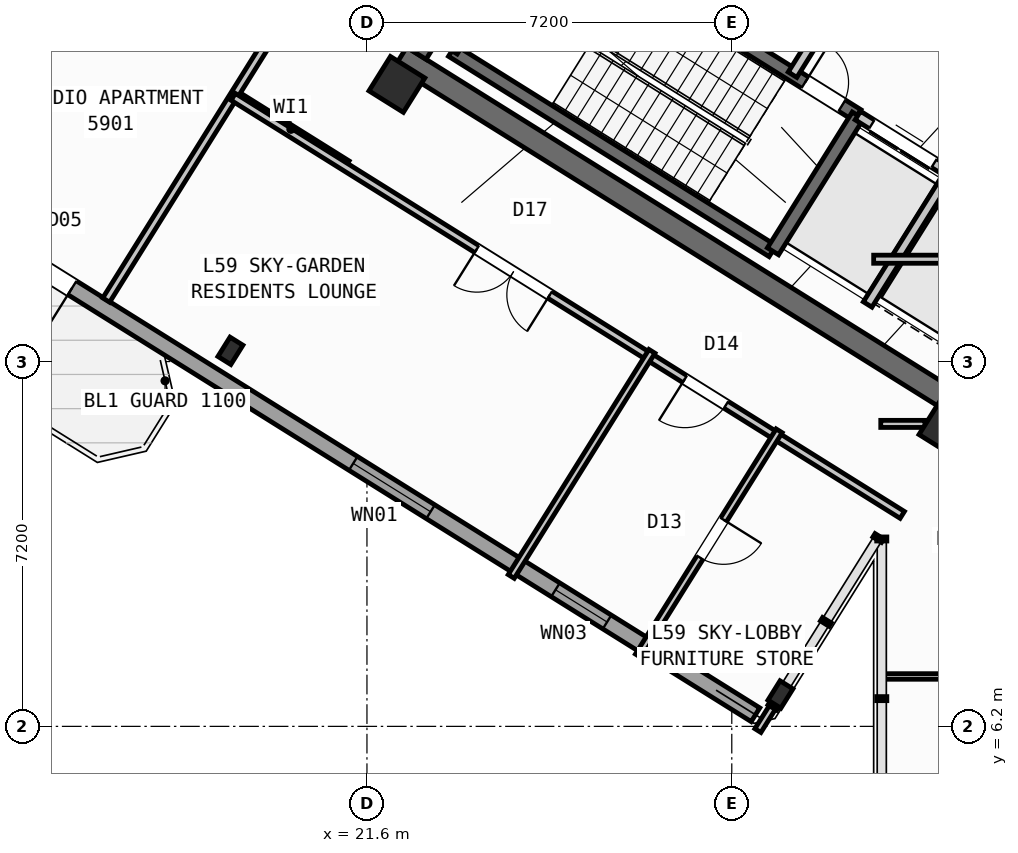
"""IFC4 building model, lengths in metres.
Left out: names, types, materials, properties, quantities, classifications, styles, units other than length and angle.
Written with IfcOpenShell. Run it as: python <this file> out.ifc"""

import sys

from ifc_helpers import new_model, si_unit, direction, frame, frame_2d, origin, origin_2d, place, context, subcontext, project, spatial, rectangle, hollow_rectangle, i_section, extrude, source, transform, mapped, element, fill, save


model = new_model("IFC4")
c1 = context("Model", 3, precision=1e-05, world=origin(), true_north=direction((0.0, 1.0)))
c2 = subcontext(c1, "Body", "Model", "MODEL_VIEW")
j1 = project(units=[si_unit("LENGTHUNIT", "METRE"), si_unit("PLANEANGLEUNIT", "RADIAN")], contexts=[c1])
p1 = place(None, origin())
s1 = spatial("IfcSite", under=j1, at=p1, CompositionType="ELEMENT")
p2 = place(p1, origin())
s2 = spatial("IfcBuilding", under=s1, at=p2, CompositionType="ELEMENT")
p3 = place(p2, frame((0.0, 0.0, 233.7)))
s3 = spatial("IfcBuildingStorey", under=s2, at=p3, CompositionType="ELEMENT", Elevation=233.7)
p4 = place(p3, frame((33.324, 12.503, 0.0), z_axis=(0.0, 0.0, 1.0), x_axis=(-0.848043529849, 0.529926571782, 0.0)))
e1 = element("IfcWall", 1, at=p4, inside=s3, PredefinedType="SHEAR", context=c2, shape_type="SweptSolid", body=[
    extrude(rectangle(XDim=13.04, YDim=0.45, at=frame_2d((6.52, 0.0))), origin(), (0.0, 0.0, 1.0), 4.55),
])
p5 = place(p3, frame((26.007, 24.976, 0.0), z_axis=(0.0, 0.0, 1.0), x_axis=(-0.529931155655, -0.848040665456, 0.0)))
e2 = element("IfcWall", 2, at=p5, inside=s3, PredefinedType="SHEAR", context=c2, shape_type="SweptSolid", body=[
    extrude(rectangle(XDim=6.475, YDim=0.45, at=frame_2d((3.238, 0.0))), origin(), (0.0, 0.0, 1.0), 4.55),
])
m1 = source(origin(), c2, "Body", "SweptSolid", [
    extrude(hollow_rectangle(XDim=0.8, YDim=0.8, WallThickness=0.032, at=origin_2d()), origin(), (0.0, 0.0, 1.0), 4.8),
])
p6 = place(p3, frame((33.046, 12.087, 0.0), z_axis=(0.0, 0.0, 1.0), x_axis=(-0.848048096156, 0.529919264233, 0.0)))
e3 = element("IfcColumn", 3, at=p6, inside=s3, PredefinedType="COLUMN", context=c2, shape_type="MappedRepresentation", body=[
    mapped(m1, transform((0.0, 0.0, 0.0), scale=1.0)),
])
m2 = source(origin(), c2, "Body", "SweptSolid", [
    extrude(i_section(OverallWidth=0.3, OverallDepth=0.45, WebThickness=0.014, FlangeThickness=0.026, at=origin_2d()), origin(), (0.0, 0.0, 1.0), 4.8),
])
p7 = place(p3, frame((29.761, 6.829, 0.0), z_axis=(0.0, 0.0, 1.0), x_axis=(-0.848048096156, 0.529919264233, 0.0)))
e4 = element("IfcColumn", 4, at=p7, inside=s3, PredefinedType="COLUMN", context=c2, shape_type="MappedRepresentation", body=[
    mapped(m2, transform((0.0, 0.0, 0.0), scale=1.0)),
])
p8 = place(p3, frame((22.191, 18.87, 0.0), z_axis=(0.0, 0.0, 1.0), x_axis=(-0.848048096156, 0.529919264233, 0.0)))
e5 = element("IfcColumn", 5, at=p8, inside=s3, PredefinedType="COLUMN", context=c2, shape_type="MappedRepresentation", body=[
    mapped(m1, transform((0.0, 0.0, 0.0), scale=1.0)),
])
p9 = place(p3, frame((18.906, 13.612, 0.0), z_axis=(0.0, 0.0, 1.0), x_axis=(-0.848048096156, 0.529919264233, 0.0)))
e6 = element("IfcColumn", 6, at=p9, inside=s3, PredefinedType="COLUMN", context=c2, shape_type="MappedRepresentation", body=[
    mapped(m2, transform((0.0, 0.0, 0.0), scale=1.0)),
])
p10 = place(p3, frame((29.268, 6.429, 0.0), z_axis=(0.0, 0.0, 1.0), x_axis=(-0.848049971435, 0.529916263149, 0.0)))
e7 = element("IfcWall", 7, at=p10, inside=s3, PredefinedType="STANDARD", context=c2, shape_type="SweptSolid", body=[
    extrude(rectangle(XDim=31.588, YDim=0.32, at=frame_2d((15.794, 0.0))), origin(), (0.0, 0.0, 1.0), 4.55),
])
p11 = place(p10, frame((15.901, 0.0, 0.0)))
e8 = element("IfcOpeningElement", 8, at=p11, cuts=e7, PredefinedType="OPENING", context=c2, shape_type="SweptSolid", body=[
    extrude(rectangle(XDim=1.2, YDim=2.15, at=frame_2d((0.6, 1.075))), frame((0.0, 0.17, 0.0), z_axis=(0.0, -1.0, 0.0), x_axis=(1.0, 0.0, 0.0)), (0.0, 0.0, 1.0), 0.34),
])
p12 = place(p10, frame((3.454, 0.0, 0.95)))
e9 = element("IfcOpeningElement", 9, at=p12, cuts=e7, PredefinedType="OPENING", context=c2, shape_type="SweptSolid", body=[
    extrude(rectangle(XDim=1.2, YDim=1.4, at=frame_2d((0.6, 0.7))), frame((0.0, 0.17, 0.0), z_axis=(0.0, -1.0, 0.0), x_axis=(1.0, 0.0, 0.0)), (0.0, 0.0, 1.0), 0.34),
])
p13 = place(p10, frame((7.561, 0.0, 0.85)))
e10 = element("IfcOpeningElement", 10, at=p13, cuts=e7, PredefinedType="OPENING", context=c2, shape_type="SweptSolid", body=[
    extrude(rectangle(XDim=1.8, YDim=1.5, at=frame_2d((0.9, 0.75))), frame((0.0, 0.17, 0.0), z_axis=(0.0, -1.0, 0.0), x_axis=(1.0, 0.0, 0.0)), (0.0, 0.0, 1.0), 0.34),
])
p14 = place(p10, frame((28.254, 0.0, 0.95)))
e11 = element("IfcOpeningElement", 11, at=p14, cuts=e7, PredefinedType="OPENING", context=c2, shape_type="SweptSolid", body=[
    extrude(rectangle(XDim=1.2, YDim=1.4, at=frame_2d((0.6, 0.7))), frame((0.0, 0.17, 0.0), z_axis=(0.0, -1.0, 0.0), x_axis=(1.0, 0.0, 0.0)), (0.0, 0.0, 1.0), 0.34),
])
p15 = place(p10, frame((19.234, 0.0, 1.0)))
e12 = element("IfcOpeningElement", 12, at=p15, cuts=e7, PredefinedType="OPENING", context=c2, shape_type="SweptSolid", body=[
    extrude(rectangle(XDim=0.9, YDim=1.25, at=frame_2d((0.45, 0.625))), frame((0.0, 0.17, 0.0), z_axis=(0.0, -1.0, 0.0), x_axis=(1.0, 0.0, 0.0)), (0.0, 0.0, 1.0), 0.34),
])
p16 = place(p10, frame((21.721, 0.0, 1.0)))
e13 = element("IfcOpeningElement", 13, at=p16, cuts=e7, PredefinedType="OPENING", context=c2, shape_type="SweptSolid", body=[
    extrude(rectangle(XDim=0.65, YDim=1.15, at=frame_2d((0.325, 0.575))), frame((0.0, 0.17, 0.0), z_axis=(0.0, -1.0, 0.0), x_axis=(1.0, 0.0, 0.0)), (0.0, 0.0, 1.0), 0.34),
])
p17 = place(p10, frame((23.631, 0.0, 1.0)))
e14 = element("IfcOpeningElement", 14, at=p17, cuts=e7, PredefinedType="OPENING", context=c2, shape_type="SweptSolid", body=[
    extrude(rectangle(XDim=0.9, YDim=1.25, at=frame_2d((0.45, 0.625))), frame((0.0, 0.17, 0.0), z_axis=(0.0, -1.0, 0.0), x_axis=(1.0, 0.0, 0.0)), (0.0, 0.0, 1.0), 0.34),
])
p18 = place(p10, frame((25.666, 0.0, 1.0)))
e15 = element("IfcOpeningElement", 15, at=p18, cuts=e7, PredefinedType="OPENING", context=c2, shape_type="SweptSolid", body=[
    extrude(rectangle(XDim=0.9, YDim=1.25, at=frame_2d((0.45, 0.625))), frame((0.0, 0.17, 0.0), z_axis=(0.0, -1.0, 0.0), x_axis=(1.0, 0.0, 0.0)), (0.0, 0.0, 1.0), 0.34),
])
p19 = place(p3, frame((29.605, 15.581, 0.0), z_axis=(0.0, 0.0, 1.0), x_axis=(-0.848036911448, 0.529937163087, 0.0)))
e16 = element("IfcWall", 16, at=p19, inside=s3, PredefinedType="SHEAR", context=c2, shape_type="SweptSolid", body=[
    extrude(rectangle(XDim=7.46, YDim=0.26, at=frame_2d((3.73, 0.0))), origin(), (0.0, 0.0, 1.0), 4.55),
])
p20 = place(p3, frame((31.28, 18.261, 0.0), z_axis=(0.0, 0.0, 1.0), x_axis=(-0.848051618787, 0.529913626805, 0.0)))
e17 = element("IfcWall", 17, at=p20, inside=s3, PredefinedType="SHEAR", context=c2, shape_type="SweptSolid", body=[
    extrude(rectangle(XDim=7.46, YDim=0.26, at=frame_2d((3.73, 0.0))), origin(), (0.0, 0.0, 1.0), 4.55),
])
p21 = place(p20, frame((0.36, 0.0, 0.0)))
e18 = element("IfcOpeningElement", 18, at=p21, cuts=e17, PredefinedType="OPENING", context=c2, shape_type="SweptSolid", body=[
    extrude(rectangle(XDim=0.86, YDim=2.05, at=frame_2d((0.43, 1.025))), frame((0.0, 0.14, 0.0), z_axis=(0.0, -1.0, 0.0), x_axis=(1.0, 0.0, 0.0)), (0.0, 0.0, 1.0), 0.28),
])
p22 = place(p3, frame((31.288, 18.256, 0.0), z_axis=(0.0, 0.0, 1.0), x_axis=(-0.529943379326, -0.848033026897, 0.0)))
e19 = element("IfcWall", 19, at=p22, inside=s3, PredefinedType="SHEAR", context=c2, shape_type="SweptSolid", body=[
    extrude(rectangle(XDim=3.16, YDim=0.26, at=frame_2d((1.58, 0.0))), origin(), (0.0, 0.0, 1.0), 4.55),
])
p23 = place(p3, frame((24.945, 22.22, 0.0), z_axis=(0.0, 0.0, 1.0), x_axis=(-0.529908658664, -0.84805472316, 0.0)))
e20 = element("IfcWall", 20, at=p23, inside=s3, PredefinedType="SHEAR", context=c2, shape_type="SweptSolid", body=[
    extrude(rectangle(XDim=3.16, YDim=0.26, at=frame_2d((1.58, 0.0))), origin(), (0.0, 0.0, 1.0), 4.55),
])
p24 = place(p3, frame((34.933, 15.978, 0.0), z_axis=(0.0, 0.0, 1.0), x_axis=(-0.848055739377, 0.529907032327, 0.0)))
e21 = element("IfcWall", 21, at=p24, inside=s3, PredefinedType="STANDARD", context=c2, shape_type="SweptSolid", body=[
    extrude(rectangle(XDim=4.298, YDim=0.2, at=frame_2d((2.149, 0.0))), origin(), (0.0, 0.0, 1.0), 4.54),
])
p25 = place(p24, frame((0.448, 0.0, 0.0)))
e22 = element("IfcOpeningElement", 22, at=p25, cuts=e21, PredefinedType="OPENING", context=c2, shape_type="SweptSolid", body=[
    extrude(rectangle(XDim=1.3, YDim=2.2, at=frame_2d((0.65, 1.1))), frame((0.0, 0.11, 0.0), z_axis=(0.0, -1.0, 0.0), x_axis=(1.0, 0.0, 0.0)), (0.0, 0.0, 1.0), 0.22),
])
p26 = place(p24, frame((2.523, 0.0, 0.0)))
e23 = element("IfcOpeningElement", 23, at=p26, cuts=e21, PredefinedType="OPENING", context=c2, shape_type="SweptSolid", body=[
    extrude(rectangle(XDim=1.45, YDim=2.25, at=frame_2d((0.725, 1.125))), frame((0.0, 0.11, 0.0), z_axis=(0.0, -1.0, 0.0), x_axis=(1.0, 0.0, 0.0)), (0.0, 0.0, 1.0), 0.22),
])
p27 = place(p3, frame((36.459, 18.421, 0.0), z_axis=(0.0, 0.0, 1.0), x_axis=(-0.848059591691, 0.529900867089, 0.0)))
e24 = element("IfcWall", 24, at=p27, inside=s3, PredefinedType="STANDARD", context=c2, shape_type="SweptSolid", body=[
    extrude(rectangle(XDim=5.818, YDim=0.2, at=frame_2d((2.909, 0.0))), origin(), (0.0, 0.0, 1.0), 4.54),
])
p28 = place(p27, frame((2.598, 0.0, 0.0)))
e25 = element("IfcOpeningElement", 25, at=p28, cuts=e24, PredefinedType="OPENING", context=c2, shape_type="SweptSolid", body=[
    extrude(rectangle(XDim=1.15, YDim=2.1, at=frame_2d((0.575, 1.05))), frame((0.0, 0.11, 0.0), z_axis=(0.0, -1.0, 0.0), x_axis=(1.0, 0.0, 0.0)), (0.0, 0.0, 1.0), 0.22),
])
p29 = place(p3, frame((33.029, 17.003, 0.0), z_axis=(0.0, 0.0, 1.0), x_axis=(-0.529916267533, -0.848049968695, 0.0)))
e26 = element("IfcWall", 26, at=p29, inside=s3, PredefinedType="STANDARD", context=c2, shape_type="SweptSolid", body=[
    extrude(rectangle(XDim=2.92, YDim=0.2, at=frame_2d((1.46, 0.0))), origin(), (0.0, 0.0, 1.0), 4.54),
])
p30 = place(p3, frame((31.525, 21.504, 0.0), z_axis=(0.0, 0.0, 1.0), x_axis=(-0.529907497854, -0.848055448493, 0.0)))
e27 = element("IfcWall", 27, at=p30, inside=s3, PredefinedType="STANDARD", context=c2, shape_type="SweptSolid", body=[
    extrude(rectangle(XDim=2.88, YDim=0.2, at=frame_2d((1.44, 0.0))), origin(), (0.0, 0.0, 1.0), 4.54),
])
p31 = place(p3, frame((21.206, 17.292, 0.0), z_axis=(0.0, 0.0, 1.0), x_axis=(-0.848050851465, 0.529914854792, 0.0)))
e28 = element("IfcWall", 28, at=p31, inside=s3, PredefinedType="PARTITIONING", context=c2, shape_type="SweptSolid", body=[
    extrude(rectangle(XDim=2.61, YDim=0.16, at=frame_2d((1.305, 0.0))), origin(), (0.0, 0.0, 1.0), 4.54),
])
p32 = place(p3, frame((23.899, 26.529, 0.0), z_axis=(0.0, 0.0, 1.0), x_axis=(-0.529917716469, -0.848049063305, 0.0)))
e29 = element("IfcWall", 29, at=p32, inside=s3, PredefinedType="PARTITIONING", context=c2, shape_type="SweptSolid", body=[
    extrude(rectangle(XDim=14.05, YDim=0.16, at=frame_2d((7.025, 0.0))), origin(), (0.0, 0.0, 1.0), 4.54),
])
p33 = place(p3, frame((16.545, 21.912, 0.0), z_axis=(0.0, 0.0, 1.0), x_axis=(-0.529927777772, -0.848042776247, 0.0)))
e30 = element("IfcWall", 30, at=p33, inside=s3, PredefinedType="PARTITIONING", context=c2, shape_type="SweptSolid", body=[
    extrude(rectangle(XDim=5.551, YDim=0.16, at=frame_2d((2.775, 0.0))), origin(), (0.0, 0.0, 1.0), 4.075),
])
p34 = place(p3, frame((16.638, 25.901, 0.0), z_axis=(0.0, 0.0, 1.0), x_axis=(-0.529910626741, -0.8480534934, 0.0)))
e31 = element("IfcWall", 31, at=p34, inside=s3, PredefinedType="PARTITIONING", context=c2, shape_type="SweptSolid", body=[
    extrude(rectangle(XDim=9.94, YDim=0.11, at=frame_2d((4.97, 0.0))), origin(), (0.0, 0.0, 1.0), 4.225),
])
p35 = place(p3, frame((32.164, 10.374, 0.0), z_axis=(0.0, 0.0, 1.0), x_axis=(-0.848044107957, 0.529925646633, 0.0)))
e32 = element("IfcWall", 32, at=p35, inside=s3, PredefinedType="PARTITIONING", context=c2, shape_type="SweptSolid", body=[
    extrude(rectangle(XDim=15.57, YDim=0.16, at=frame_2d((7.785, 0.0))), origin(), (0.0, 0.0, 1.0), 4.54),
])
p36 = place(p35, frame((4.1, 0.0, 0.0)))
e33 = element("IfcOpeningElement", 33, at=p36, cuts=e32, PredefinedType="OPENING", context=c2, shape_type="SweptSolid", body=[
    extrude(rectangle(XDim=0.96, YDim=2.08, at=frame_2d((0.48, 1.04))), frame((0.0, 0.09, 0.0), z_axis=(0.0, -1.0, 0.0), x_axis=(1.0, 0.0, 0.0)), (0.0, 0.0, 1.0), 0.18),
])
p37 = place(p35, frame((8.2, 0.0, 0.0)))
e34 = element("IfcOpeningElement", 34, at=p37, cuts=e32, PredefinedType="OPENING", context=c2, shape_type="SweptSolid", body=[
    extrude(rectangle(XDim=1.7, YDim=2.2, at=frame_2d((0.85, 1.1))), frame((0.0, 0.09, 0.0), z_axis=(0.0, -1.0, 0.0), x_axis=(1.0, 0.0, 0.0)), (0.0, 0.0, 1.0), 0.18),
])
p38 = place(p3, frame((29.735, 12.034, 0.0), z_axis=(0.0, 0.0, 1.0), x_axis=(-0.529890046623, -0.848066352646, 0.0)))
e35 = element("IfcWall", 35, at=p38, inside=s3, PredefinedType="PLUMBINGWALL", context=c2, shape_type="SweptSolid", body=[
    extrude(rectangle(XDim=5.24, YDim=0.14, at=frame_2d((2.62, 0.0))), origin(), (0.0, 0.0, 1.0), 4.54),
])
p39 = place(p38, frame((2.07, 0.0, 0.0)))
e36 = element("IfcOpeningElement", 36, at=p39, cuts=e35, PredefinedType="OPENING", context=c2, shape_type="SweptSolid", body=[
    extrude(rectangle(XDim=0.88, YDim=2.08, at=frame_2d((0.44, 1.04))), frame((0.0, 0.08, 0.0), z_axis=(0.0, -1.0, 0.0), x_axis=(1.0, 0.0, 0.0)), (0.0, 0.0, 1.0), 0.16),
])
p40 = place(p3, frame((29.635, 6.628, 0.0), z_axis=(0.0, 0.0, 1.0), x_axis=(-0.530071736977, -0.847952801551, 0.0)))
e37 = element("IfcWall", 37, at=p40, inside=s3, PredefinedType="PLUMBINGWALL", context=c2, shape_type="SweptSolid", body=[
    extrude(rectangle(XDim=0.603, YDim=0.14, at=frame_2d((0.301, 0.0))), origin(), (0.0, 0.0, 1.0), 4.54),
])
p41 = place(p3, frame((27.225, 13.602, 0.0), z_axis=(0.0, 0.0, 1.0), x_axis=(-0.529944493599, -0.848032330577, 0.0)))
e38 = element("IfcWall", 38, at=p41, inside=s3, PredefinedType="PLUMBINGWALL", context=c2, shape_type="SweptSolid", body=[
    extrude(rectangle(XDim=5.24, YDim=0.14, at=frame_2d((2.62, 0.0))), origin(), (0.0, 0.0, 1.0), 4.54),
])
p42 = place(p3, frame((31.6, 15.42, 0.0), z_axis=(0.0, 0.0, 1.0), x_axis=(1.0, 0.0, 0.0)))
e39 = element("IfcWall", 39, at=p42, inside=s3, PredefinedType="PARTITIONING", context=c2, shape_type="SweptSolid", body=[
    extrude(rectangle(XDim=2.984, YDim=0.16, at=frame_2d((1.492, 0.0))), origin(), (0.0, 0.0, 1.0), 4.54),
])
p43 = place(p3, frame((31.74, 12.17, 0.0), z_axis=(0.0, 0.0, 1.0), x_axis=(1.0, 0.0, 0.0)))
e40 = element("IfcWall", 40, at=p43, inside=s3, PredefinedType="PLUMBINGWALL", context=c2, shape_type="SweptSolid", body=[
    extrude(rectangle(XDim=0.872, YDim=0.14, at=frame_2d((0.436, 0.0))), origin(), (0.0, 0.0, 1.0), 4.54),
])
p44 = place(p3, frame((31.74, 7.185, 0.0), z_axis=(0.0, 0.0, 1.0), x_axis=(1.0, 0.0, 0.0)))
e41 = element("IfcWall", 41, at=p44, inside=s3, PredefinedType="PARTITIONING", context=c2, shape_type="SweptSolid", body=[
    extrude(rectangle(XDim=10.604, YDim=0.11, at=frame_2d((5.302, 0.0))), origin(), (0.0, 0.0, 1.0), 4.54),
])
p45 = place(p44, frame((5.022, 0.0, 0.0)))
e42 = element("IfcOpeningElement", 42, at=p45, cuts=e41, PredefinedType="OPENING", context=c2, shape_type="SweptSolid", body=[
    extrude(rectangle(XDim=0.92, YDim=2.08, at=frame_2d((0.46, 1.04))), frame((0.0, 0.065, 0.0), z_axis=(0.0, -1.0, 0.0), x_axis=(1.0, 0.0, 0.0)), (0.0, 0.0, 1.0), 0.13),
])
m3 = source(origin(), c2, "Body", "SweptSolid", [
    extrude(rectangle(XDim=1.2, YDim=2.15, at=frame_2d((0.6, 1.075))), frame((0.0, 0.025, 0.0), z_axis=(0.0, -1.0, 0.0), x_axis=(1.0, 0.0, 0.0)), (0.0, 0.0, 1.0), 0.05),
])
p46 = place(p11, origin())
e43 = element("IfcDoor", 43, at=p46, inside=s3, OperationType="SINGLE_SWING_LEFT", PredefinedType="DOOR", context=c2, shape_type="MappedRepresentation", body=[
    mapped(m3, transform((0.0, 0.0, 0.0), scale=1.0)),
])
fill(e8, e43)
m4 = source(origin(), c2, "Body", "SweptSolid", [
    extrude(rectangle(XDim=1.2, YDim=1.4, at=frame_2d((0.6, 0.7))), frame((0.0, 0.03, 0.0), z_axis=(0.0, -1.0, 0.0), x_axis=(1.0, 0.0, 0.0)), (0.0, 0.0, 1.0), 0.06),
])
p47 = place(p12, origin())
e44 = element("IfcWindow", 44, at=p47, inside=s3, PartitioningType="SINGLE_PANEL", PredefinedType="WINDOW", context=c2, shape_type="MappedRepresentation", body=[
    mapped(m4, transform((0.0, 0.0, 0.0), scale=1.0)),
])
fill(e9, e44)
m5 = source(origin(), c2, "Body", "SweptSolid", [
    extrude(rectangle(XDim=1.8, YDim=1.5, at=frame_2d((0.9, 0.75))), frame((0.0, 0.03, 0.0), z_axis=(0.0, -1.0, 0.0), x_axis=(1.0, 0.0, 0.0)), (0.0, 0.0, 1.0), 0.06),
])
p48 = place(p13, origin())
e45 = element("IfcWindow", 45, at=p48, inside=s3, PartitioningType="SINGLE_PANEL", PredefinedType="WINDOW", context=c2, shape_type="MappedRepresentation", body=[
    mapped(m5, transform((0.0, 0.0, 0.0), scale=1.0)),
])
fill(e10, e45)
m6 = source(origin(), c2, "Body", "SweptSolid", [
    extrude(rectangle(XDim=0.86, YDim=2.05, at=frame_2d((0.43, 1.025))), frame((0.0, 0.025, 0.0), z_axis=(0.0, -1.0, 0.0), x_axis=(1.0, 0.0, 0.0)), (0.0, 0.0, 1.0), 0.05),
])
p49 = place(p21, frame((0.86, 0.0, 0.0), z_axis=(0.0, 0.0, 1.0), x_axis=(-1.0, 0.0, 0.0)))
e46 = element("IfcDoor", 46, at=p49, inside=s3, OperationType="SINGLE_SWING_LEFT", PredefinedType="DOOR", context=c2, shape_type="MappedRepresentation", body=[
    mapped(m6, transform((0.0, 0.0, 0.0), scale=1.0)),
])
fill(e18, e46)
m7 = source(origin(), c2, "Body", "SweptSolid", [
    extrude(rectangle(XDim=1.45, YDim=2.25, at=frame_2d((0.725, 1.125))), frame((0.0, 0.025, 0.0), z_axis=(0.0, -1.0, 0.0), x_axis=(1.0, 0.0, 0.0)), (0.0, 0.0, 1.0), 0.05),
])
p50 = place(p26, origin())
e47 = element("IfcDoor", 47, at=p50, inside=s3, OperationType="DOUBLE_DOOR_SLIDING", PredefinedType="DOOR", context=c2, shape_type="MappedRepresentation", body=[
    mapped(m7, transform((0.0, 0.0, 0.0), scale=1.0)),
])
fill(e23, e47)
m8 = source(origin(), c2, "Body", "SweptSolid", [
    extrude(rectangle(XDim=0.88, YDim=2.08, at=frame_2d((0.44, 1.04))), frame((0.0, 0.025, 0.0), z_axis=(0.0, -1.0, 0.0), x_axis=(1.0, 0.0, 0.0)), (0.0, 0.0, 1.0), 0.05),
])
p51 = place(p39, origin())
e48 = element("IfcDoor", 48, at=p51, inside=s3, OperationType="SINGLE_SWING_LEFT", PredefinedType="DOOR", context=c2, shape_type="MappedRepresentation", body=[
    mapped(m8, transform((0.0, 0.0, 0.0), scale=1.0)),
])
fill(e36, e48)
m9 = source(origin(), c2, "Body", "SweptSolid", [
    extrude(rectangle(XDim=0.96, YDim=2.08, at=frame_2d((0.48, 1.04))), frame((0.0, 0.025, 0.0), z_axis=(0.0, -1.0, 0.0), x_axis=(1.0, 0.0, 0.0)), (0.0, 0.0, 1.0), 0.05),
])
p52 = place(p36, origin())
e49 = element("IfcDoor", 49, at=p52, inside=s3, OperationType="SINGLE_SWING_RIGHT", PredefinedType="DOOR", context=c2, shape_type="MappedRepresentation", body=[
    mapped(m9, transform((0.0, 0.0, 0.0), scale=1.0)),
])
fill(e33, e49)
m10 = source(origin(), c2, "Body", "SweptSolid", [
    extrude(rectangle(XDim=1.7, YDim=2.2, at=frame_2d((0.85, 1.1))), frame((0.0, 0.025, 0.0), z_axis=(0.0, -1.0, 0.0), x_axis=(1.0, 0.0, 0.0)), (0.0, 0.0, 1.0), 0.05),
])
p53 = place(p37, origin())
e50 = element("IfcDoor", 50, at=p53, inside=s3, OperationType="DOUBLE_DOOR_SINGLE_SWING", PredefinedType="DOOR", context=c2, shape_type="MappedRepresentation", body=[
    mapped(m10, transform((0.0, 0.0, 0.0), scale=1.0)),
])
fill(e34, e50)
save(model, sys.argv[1])
